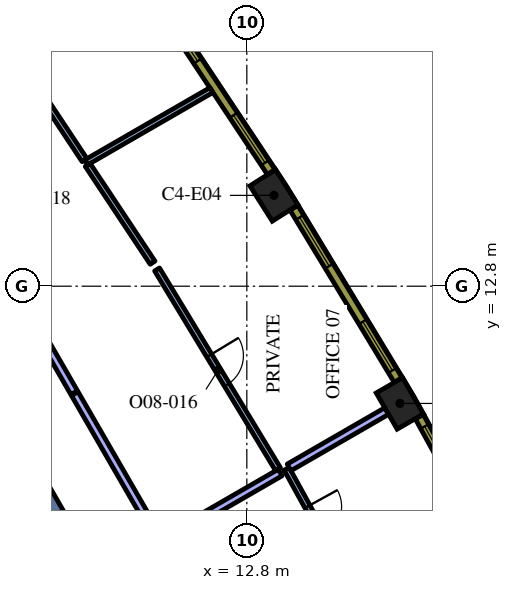
"""IFC4 building model, lengths in metres.
Left out: names, types, materials, properties, quantities, classifications, styles, units other than length and angle.
Written with IfcOpenShell. Run it as: python <this file> out.ifc"""

import sys

from ifc_helpers import new_model, si_unit, direction, frame, frame_2d, origin, origin_2d, place, context, subcontext, project, spatial, rectangle, extrude, element, fill, save


model = new_model("IFC4")
c1 = context("Model", 3, precision=1e-05, world=origin(), true_north=direction((0.0, 1.0)))
c2 = subcontext(c1, "Body", "Model", "MODEL_VIEW")
j1 = project(units=[si_unit("LENGTHUNIT", "METRE"), si_unit("PLANEANGLEUNIT", "RADIAN")], contexts=[c1])
p1 = place(None, origin())
s1 = spatial("IfcSite", under=j1, at=p1, CompositionType="ELEMENT")
p2 = place(p1, origin())
s2 = spatial("IfcBuilding", under=s1, at=p2, CompositionType="ELEMENT")
p3 = place(p2, frame((0.0, 0.0, 231.0)))
s3 = spatial("IfcBuildingStorey", under=s2, at=p3, CompositionType="ELEMENT", Elevation=231.0)
for number, where, z_axis, x_axis in (
    (1, (16.827, 9.715, 0.0), (0.0, 0.0, 1.0), (-0.5, 0.866, 0.0)),
    (2, (13.513, 15.19, 0.0), (0.0, 0.0, 1.0), (-0.536, 0.845, 0.0)),
):
    element("IfcColumn", number, at=place(p3, frame(where, z_axis=z_axis, x_axis=x_axis)), inside=s3, PredefinedType="COLUMN", context=c2, shape_type="SweptSolid", body=[
        extrude(rectangle(XDim=1.1, YDim=0.8, at=origin_2d()), origin(), (0.0, 0.0, 1.0), 4.2),
    ])
p4 = place(p3, frame((8.235, 5.736, 0.0), z_axis=(0.0, 0.0, 1.0), x_axis=(-0.499983401189, 0.8660349869, 0.0)))
e3 = element("IfcWall", 3, at=p4, inside=s3, PredefinedType="SOLIDWALL", context=c2, shape_type="SweptSolid", body=[
    extrude(rectangle(XDim=12.472, YDim=0.7, at=frame_2d((6.236, 0.0))), origin(), (0.0, 0.0, 1.0), 4.2),
])
p5 = place(p3, frame((8.565, -2.185, 0.0), z_axis=(0.0, 0.0, 1.0), x_axis=(-0.499997954832, 0.866026584559, 0.0)))
e4 = element("IfcWall", 4, at=p5, inside=s3, PredefinedType="SOLIDWALL", context=c2, shape_type="SweptSolid", body=[
    extrude(rectangle(XDim=12.35, YDim=0.25, at=frame_2d((6.175, 0.0))), origin(), (0.0, 0.0, 1.0), 4.2),
])
p6 = place(p5, frame((0.585, 0.0, 0.0)))
e5 = element("IfcOpeningElement", 5, at=p6, cuts=e4, PredefinedType="OPENING", context=c2, shape_type="SweptSolid", body=[
    extrude(rectangle(XDim=1.1, YDim=2.1, at=frame_2d((0.55, 1.05))), frame((0.0, 0.135, 0.0), z_axis=(0.0, -1.0, 0.0), x_axis=(1.0, 0.0, 0.0)), (0.0, 0.0, 1.0), 0.27),
])
p7 = place(p3, frame((15.394, 5.183, 0.0), z_axis=(0.0, 0.0, 1.0), x_axis=(0.866039935929, 0.499974828743, 0.0)))
e6 = element("IfcWall", 6, at=p7, inside=s3, PredefinedType="PARTITIONING", context=c2, shape_type="SweptSolid", body=[
    extrude(rectangle(XDim=3.601, YDim=0.15, at=frame_2d((1.8, 0.0))), origin(), (0.0, 0.0, 1.0), 3.45),
])
p8 = place(p3, frame((13.848, 7.995, 0.0), z_axis=(0.0, 0.0, 1.0), x_axis=(0.481894826099, -0.876229066272, 0.0)))
e7 = element("IfcWall", 7, at=p8, inside=s3, PredefinedType="PARTITIONING", context=c2, shape_type="SweptSolid", body=[
    extrude(rectangle(XDim=3.134, YDim=0.15, at=frame_2d((1.567, 0.0))), origin(), (0.0, 0.0, 1.0), 3.45),
])
p9 = place(p8, frame((1.134, 0.0, 0.0)))
e8 = element("IfcOpeningElement", 8, at=p9, cuts=e7, PredefinedType="OPENING", context=c2, shape_type="SweptSolid", body=[
    extrude(rectangle(XDim=0.9, YDim=2.1, at=frame_2d((0.45, 1.05))), frame((0.0, 0.085, 0.0), z_axis=(0.0, -1.0, 0.0), x_axis=(1.0, 0.0, 0.0)), (0.0, 0.0, 1.0), 0.17),
])
p10 = place(p3, frame((13.913, 8.032, 0.0), z_axis=(0.0, 0.0, 1.0), x_axis=(0.866015594979, 0.500016988964, 0.0)))
e9 = element("IfcWall", 9, at=p10, inside=s3, PredefinedType="PARTITIONING", context=c2, shape_type="SweptSolid", body=[
    extrude(rectangle(XDim=2.966, YDim=0.2, at=frame_2d((1.483, 0.0))), origin(), (0.0, 0.0, 1.0), 3.45),
])
p11 = place(p3, frame((10.522, 6.075, 0.0), z_axis=(0.0, 0.0, 1.0), x_axis=(0.866003708037, 0.500037576254, 0.0)))
e10 = element("IfcWall", 10, at=p11, inside=s3, PredefinedType="PARTITIONING", context=c2, shape_type="SweptSolid", body=[
    extrude(rectangle(XDim=3.644, YDim=0.2, at=frame_2d((1.822, 0.0))), origin(), (0.0, 0.0, 1.0), 3.45),
])
p12 = place(p3, frame((8.57, 16.056, 0.0), z_axis=(0.0, 0.0, 1.0), x_axis=(0.866000839906, 0.500042543472, 0.0)))
e11 = element("IfcWall", 11, at=p12, inside=s3, PredefinedType="PARTITIONING", context=c2, shape_type="SweptSolid", body=[
    extrude(rectangle(XDim=3.807, YDim=0.15, at=frame_2d((1.904, 0.0))), origin(), (0.0, 0.0, 1.0), 3.45),
])
p13 = place(p3, frame((10.439, 13.24, 0.0), z_axis=(0.0, 0.0, 1.0), x_axis=(0.517837859082, -0.855478785068, 0.0)))
e12 = element("IfcWall", 12, at=p13, inside=s3, PredefinedType="PARTITIONING", context=c2, shape_type="SweptSolid", body=[
    extrude(rectangle(XDim=6.148, YDim=0.15, at=frame_2d((3.074, 0.0))), origin(), (0.0, 0.0, 1.0), 3.45),
])
p14 = place(p13, frame((2.648, 0.0, 0.0)))
e13 = element("IfcOpeningElement", 13, at=p14, cuts=e12, PredefinedType="OPENING", context=c2, shape_type="SweptSolid", body=[
    extrude(rectangle(XDim=0.9, YDim=2.1, at=frame_2d((0.45, 1.05))), frame((0.0, 0.085, 0.0), z_axis=(0.0, -1.0, 0.0), x_axis=(1.0, 0.0, 0.0)), (0.0, 0.0, 1.0), 0.17),
])
p15 = place(p3, frame((10.32, 13.419, 0.0), z_axis=(0.0, 0.0, 1.0), x_axis=(-0.552857215969, 0.833276003945, 0.0)))
e14 = element("IfcWall", 14, at=p15, inside=s3, PredefinedType="PARTITIONING", context=c2, shape_type="SweptSolid", body=[
    extrude(rectangle(XDim=3.09, YDim=0.15, at=frame_2d((1.545, 0.0))), origin(), (0.0, 0.0, 1.0), 3.45),
])
p16 = place(p3, frame((8.529, 16.118, 0.0), z_axis=(0.0, 0.0, 1.0), x_axis=(-0.552884246744, 0.833258069089, 0.0)))
e15 = element("IfcWall", 15, at=p16, inside=s3, PredefinedType="PARTITIONING", context=c2, shape_type="SweptSolid", body=[
    extrude(rectangle(XDim=2.794, YDim=0.15, at=frame_2d((1.397, 0.0))), origin(), (0.0, 0.0, 1.0), 3.45),
])
p17 = place(p3, frame((10.472, 6.162, 0.0), z_axis=(0.0, 0.0, 1.0), x_axis=(-0.499988222896, 0.866032203192, 0.0)))
e16 = element("IfcWall", 16, at=p17, inside=s3, PredefinedType="PARTITIONING", context=c2, shape_type="SweptSolid", body=[
    extrude(rectangle(XDim=4.4, YDim=0.2, at=frame_2d((2.2, 0.0))), origin(), (0.0, 0.0, 1.0), 3.45),
])
p18 = place(p3, frame((8.257, 9.998, 0.0), z_axis=(0.0, 0.0, 1.0), x_axis=(-0.499987955211, 0.866032357735, 0.0)))
e17 = element("IfcWall", 17, at=p18, inside=s3, PredefinedType="PARTITIONING", context=c2, shape_type="SweptSolid", body=[
    extrude(rectangle(XDim=9.817, YDim=0.2, at=frame_2d((4.909, 0.0))), origin(), (0.0, 0.0, 1.0), 3.45),
])
p19 = place(p18, frame((4.4, 0.0, 0.0)))
e18 = element("IfcOpeningElement", 18, at=p19, cuts=e17, PredefinedType="OPENING", context=c2, shape_type="SweptSolid", body=[
    extrude(rectangle(XDim=1.0, YDim=2.1, at=frame_2d((0.5, 1.05))), frame((0.0, 0.11, 0.0), z_axis=(0.0, -1.0, 0.0), x_axis=(1.0, 0.0, 0.0)), (0.0, 0.0, 1.0), 0.22),
])
p20 = place(p3, frame((19.892, 4.725, 0.0), z_axis=(0.0, 0.0, 1.0), x_axis=(-0.481925825015, 0.876212017256, 0.0)))
e19 = element("IfcWall", 19, at=p20, inside=s3, PredefinedType="SOLIDWALL", context=c2, shape_type="SweptSolid", body=[
    extrude(rectangle(XDim=5.299, YDim=0.24, at=frame_2d((2.649, 0.0))), origin(), (0.0, 0.0, 1.0), 3.95),
])
p21 = place(p20, frame((0.295, 0.0, 0.9)))
e20 = element("IfcOpeningElement", 20, at=p21, cuts=e19, PredefinedType="OPENING", context=c2, shape_type="SweptSolid", body=[
    extrude(rectangle(XDim=1.5, YDim=2.55, at=frame_2d((0.75, 1.275))), frame((0.0, 0.13, 0.0), z_axis=(0.0, -1.0, 0.0), x_axis=(1.0, 0.0, 0.0)), (0.0, 0.0, 1.0), 0.26),
])
p22 = place(p20, frame((3.504, 0.0, 0.9)))
e21 = element("IfcOpeningElement", 21, at=p22, cuts=e19, PredefinedType="OPENING", context=c2, shape_type="SweptSolid", body=[
    extrude(rectangle(XDim=1.5, YDim=2.55, at=frame_2d((0.75, 1.275))), frame((0.0, 0.13, 0.0), z_axis=(0.0, -1.0, 0.0), x_axis=(1.0, 0.0, 0.0)), (0.0, 0.0, 1.0), 0.26),
])
p23 = place(p3, frame((16.782, 10.331, 0.0), z_axis=(0.0, 0.0, 1.0), x_axis=(-0.517846166225, 0.855473756538, 0.0)))
e22 = element("IfcWall", 22, at=p23, inside=s3, PredefinedType="SOLIDWALL", context=c2, shape_type="SweptSolid", body=[
    extrude(rectangle(XDim=5.298, YDim=0.24, at=frame_2d((2.649, 0.0))), origin(), (0.0, 0.0, 1.0), 3.95),
])
p24 = place(p23, frame((0.294, 0.0, 0.9)))
e23 = element("IfcOpeningElement", 23, at=p24, cuts=e22, PredefinedType="OPENING", context=c2, shape_type="SweptSolid", body=[
    extrude(rectangle(XDim=1.5, YDim=2.55, at=frame_2d((0.75, 1.275))), frame((0.0, 0.13, 0.0), z_axis=(0.0, -1.0, 0.0), x_axis=(1.0, 0.0, 0.0)), (0.0, 0.0, 1.0), 0.26),
])
p25 = place(p23, frame((3.504, 0.0, 0.9)))
e24 = element("IfcOpeningElement", 24, at=p25, cuts=e22, PredefinedType="OPENING", context=c2, shape_type="SweptSolid", body=[
    extrude(rectangle(XDim=1.5, YDim=2.55, at=frame_2d((0.75, 1.275))), frame((0.0, 0.13, 0.0), z_axis=(0.0, -1.0, 0.0), x_axis=(1.0, 0.0, 0.0)), (0.0, 0.0, 1.0), 0.26),
])
p26 = place(p3, frame((13.442, 15.803, 0.0), z_axis=(0.0, 0.0, 1.0), x_axis=(-0.552901821755, 0.833246407433, 0.0)))
e25 = element("IfcWall", 25, at=p26, inside=s3, PredefinedType="SOLIDWALL", context=c2, shape_type="SweptSolid", body=[
    extrude(rectangle(XDim=5.298, YDim=0.24, at=frame_2d((2.649, 0.0))), origin(), (0.0, 0.0, 1.0), 3.95),
])
p27 = place(p26, frame((0.295, 0.0, 0.9)))
e26 = element("IfcOpeningElement", 26, at=p27, cuts=e25, PredefinedType="OPENING", context=c2, shape_type="SweptSolid", body=[
    extrude(rectangle(XDim=1.5, YDim=2.55, at=frame_2d((0.75, 1.275))), frame((0.0, 0.13, 0.0), z_axis=(0.0, -1.0, 0.0), x_axis=(1.0, 0.0, 0.0)), (0.0, 0.0, 1.0), 0.26),
])
p28 = place(p26, frame((3.504, 0.0, 0.9)))
e27 = element("IfcOpeningElement", 27, at=p28, cuts=e25, PredefinedType="OPENING", context=c2, shape_type="SweptSolid", body=[
    extrude(rectangle(XDim=1.5, YDim=2.55, at=frame_2d((0.75, 1.275))), frame((0.0, 0.13, 0.0), z_axis=(0.0, -1.0, 0.0), x_axis=(1.0, 0.0, 0.0)), (0.0, 0.0, 1.0), 0.26),
])
p29 = place(p9, origin())
e28 = element("IfcDoor", 28, at=p29, inside=s3, OperationType="SINGLE_SWING_RIGHT", PredefinedType="DOOR", context=c2, shape_type="SweptSolid", body=[
    extrude(rectangle(XDim=0.9, YDim=2.1, at=frame_2d((0.45, 1.05))), frame((0.0, 0.025, 0.0), z_axis=(0.0, -1.0, 0.0), x_axis=(1.0, 0.0, 0.0)), (0.0, 0.0, 1.0), 0.05),
])
fill(e8, e28)
p30 = place(p14, origin())
e29 = element("IfcDoor", 29, at=p30, inside=s3, OperationType="SINGLE_SWING_RIGHT", PredefinedType="DOOR", context=c2, shape_type="SweptSolid", body=[
    extrude(rectangle(XDim=0.9, YDim=2.1, at=frame_2d((0.45, 1.05))), frame((0.0, 0.025, 0.0), z_axis=(0.0, -1.0, 0.0), x_axis=(1.0, 0.0, 0.0)), (0.0, 0.0, 1.0), 0.05),
])
fill(e13, e29)
p31 = place(p22, origin())
e30 = element("IfcWindow", 30, at=p31, inside=s3, PartitioningType="SINGLE_PANEL", PredefinedType="WINDOW", context=c2, shape_type="SweptSolid", body=[
    extrude(rectangle(XDim=1.5, YDim=2.55, at=frame_2d((0.75, 1.275))), frame((0.0, 0.04, 0.0), z_axis=(0.0, -1.0, 0.0), x_axis=(1.0, 0.0, 0.0)), (0.0, 0.0, 1.0), 0.06),
])
fill(e21, e30)
p32 = place(p24, origin())
e31 = element("IfcWindow", 31, at=p32, inside=s3, PartitioningType="SINGLE_PANEL", PredefinedType="WINDOW", context=c2, shape_type="SweptSolid", body=[
    extrude(rectangle(XDim=1.5, YDim=2.55, at=frame_2d((0.75, 1.275))), frame((0.0, 0.04, 0.0), z_axis=(0.0, -1.0, 0.0), x_axis=(1.0, 0.0, 0.0)), (0.0, 0.0, 1.0), 0.06),
])
fill(e23, e31)
p33 = place(p25, origin())
e32 = element("IfcWindow", 32, at=p33, inside=s3, PartitioningType="SINGLE_PANEL", PredefinedType="WINDOW", context=c2, shape_type="SweptSolid", body=[
    extrude(rectangle(XDim=1.5, YDim=2.55, at=frame_2d((0.75, 1.275))), frame((0.0, 0.04, 0.0), z_axis=(0.0, -1.0, 0.0), x_axis=(1.0, 0.0, 0.0)), (0.0, 0.0, 1.0), 0.06),
])
fill(e24, e32)
p34 = place(p27, origin())
e33 = element("IfcWindow", 33, at=p34, inside=s3, PartitioningType="SINGLE_PANEL", PredefinedType="WINDOW", context=c2, shape_type="SweptSolid", body=[
    extrude(rectangle(XDim=1.5, YDim=2.55, at=frame_2d((0.75, 1.275))), frame((0.0, 0.04, 0.0), z_axis=(0.0, -1.0, 0.0), x_axis=(1.0, 0.0, 0.0)), (0.0, 0.0, 1.0), 0.06),
])
fill(e26, e33)
p35 = place(p28, origin())
e34 = element("IfcWindow", 34, at=p35, inside=s3, PartitioningType="SINGLE_PANEL", PredefinedType="WINDOW", context=c2, shape_type="SweptSolid", body=[
    extrude(rectangle(XDim=1.5, YDim=2.55, at=frame_2d((0.75, 1.275))), frame((0.0, 0.04, 0.0), z_axis=(0.0, -1.0, 0.0), x_axis=(1.0, 0.0, 0.0)), (0.0, 0.0, 1.0), 0.06),
])
fill(e27, e34)
save(model, sys.argv[1])
